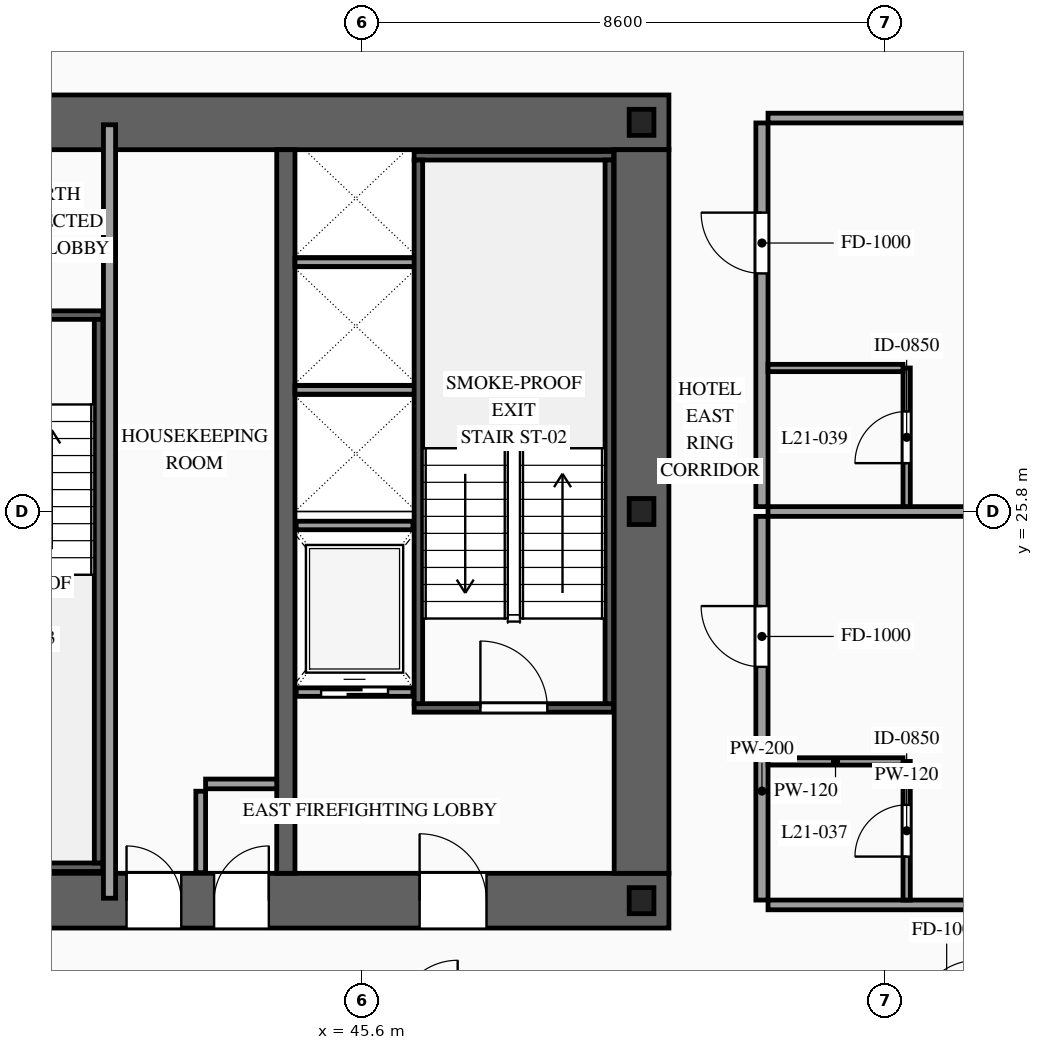
"""IFC4 building model, lengths in metres.
Left out: names, types, materials, properties, quantities, classifications, styles, units other than length and angle.
Written with IfcOpenShell. Run it as: python <this file> out.ifc"""

import sys

from ifc_helpers import new_model, si_unit, direction, frame, frame_2d, origin, origin_2d, place, context, subcontext, project, spatial, rectangle, i_section, extrude, source, transform, mapped, element, fill, save


model = new_model("IFC4")
c1 = context("Model", 3, precision=1e-05, world=origin(), true_north=direction((0.0, 1.0)))
c2 = subcontext(c1, "Body", "Model", "MODEL_VIEW")
j1 = project(units=[si_unit("LENGTHUNIT", "METRE"), si_unit("PLANEANGLEUNIT", "RADIAN")], contexts=[c1])
p1 = place(None, origin())
s1 = spatial("IfcSite", under=j1, at=p1, CompositionType="ELEMENT")
p2 = place(p1, origin())
s2 = spatial("IfcBuilding", under=s1, at=p2, CompositionType="ELEMENT")
p3 = place(p2, frame((0.0, 0.0, 82.0)))
s3 = spatial("IfcBuildingStorey", under=s2, at=p3, CompositionType="ELEMENT", Elevation=82.0)
p4 = place(p3, frame((23.35, 19.4, 0.0), z_axis=(0.0, 0.0, 1.0), x_axis=(1.0, 0.0, 0.0)))
e1 = element("IfcWall", 1, at=p4, inside=s3, PredefinedType="SHEAR", context=c2, shape_type="SweptSolid", body=[
    extrude(rectangle(XDim=27.3, YDim=0.9, at=frame_2d((13.65, 0.0))), origin(), (0.0, 0.0, 1.0), 3.6),
])
p5 = place(p4, frame((2.1, 0.0, 0.0)))
e2 = element("IfcOpeningElement", 2, at=p5, cuts=e1, PredefinedType="OPENING", context=c2, shape_type="SweptSolid", body=[
    extrude(rectangle(XDim=1.1, YDim=2.2, at=frame_2d((0.55, 1.1))), frame((0.0, 0.465, 0.0), z_axis=(0.0, -1.0, 0.0), x_axis=(1.0, 0.0, 0.0)), (0.0, 0.0, 1.0), 0.93),
])
p6 = place(p4, frame((10.0, 0.0, 0.0)))
e3 = element("IfcOpeningElement", 3, at=p6, cuts=e1, PredefinedType="OPENING", context=c2, shape_type="SweptSolid", body=[
    extrude(rectangle(XDim=1.1, YDim=2.2, at=frame_2d((0.55, 1.1))), frame((0.0, 0.465, 0.0), z_axis=(0.0, -1.0, 0.0), x_axis=(1.0, 0.0, 0.0)), (0.0, 0.0, 1.0), 0.93),
])
p7 = place(p4, frame((23.2, 0.0, 0.0)))
e4 = element("IfcOpeningElement", 4, at=p7, cuts=e1, PredefinedType="OPENING", context=c2, shape_type="SweptSolid", body=[
    extrude(rectangle(XDim=1.1, YDim=2.2, at=frame_2d((0.55, 1.1))), frame((0.0, 0.465, 0.0), z_axis=(0.0, -1.0, 0.0), x_axis=(1.0, 0.0, 0.0)), (0.0, 0.0, 1.0), 0.93),
])
p8 = place(p4, frame((19.82, 0.0, 0.0)))
e5 = element("IfcOpeningElement", 5, at=p8, cuts=e1, PredefinedType="OPENING", context=c2, shape_type="SweptSolid", body=[
    extrude(rectangle(XDim=0.9, YDim=2.15, at=frame_2d((0.45, 1.075))), frame((0.0, 0.465, 0.0), z_axis=(0.0, -1.0, 0.0), x_axis=(1.0, 0.0, 0.0)), (0.0, 0.0, 1.0), 0.93),
])
p9 = place(p4, frame((18.38, 0.0, 0.0)))
e6 = element("IfcOpeningElement", 6, at=p9, cuts=e1, PredefinedType="OPENING", context=c2, shape_type="SweptSolid", body=[
    extrude(rectangle(XDim=0.9, YDim=2.15, at=frame_2d((0.45, 1.075))), frame((0.0, 0.465, 0.0), z_axis=(0.0, -1.0, 0.0), x_axis=(1.0, 0.0, 0.0)), (0.0, 0.0, 1.0), 0.93),
])
p10 = place(p3, frame((23.35, 32.2, 0.0), z_axis=(0.0, 0.0, 1.0), x_axis=(1.0, 0.0, 0.0)))
e7 = element("IfcWall", 7, at=p10, inside=s3, PredefinedType="SHEAR", context=c2, shape_type="SweptSolid", body=[
    extrude(rectangle(XDim=27.3, YDim=0.9, at=frame_2d((13.65, 0.0))), origin(), (0.0, 0.0, 1.0), 3.6),
])
p11 = place(p10, frame((4.72, 0.0, 0.0)))
e8 = element("IfcOpeningElement", 8, at=p11, cuts=e7, PredefinedType="OPENING", context=c2, shape_type="SweptSolid", body=[
    extrude(rectangle(XDim=0.9, YDim=2.15, at=frame_2d((0.45, 1.075))), frame((0.0, 0.465, 0.0), z_axis=(0.0, -1.0, 0.0), x_axis=(1.0, 0.0, 0.0)), (0.0, 0.0, 1.0), 0.93),
])
p12 = place(p10, frame((10.0, 0.0, 0.0)))
e9 = element("IfcOpeningElement", 9, at=p12, cuts=e7, PredefinedType="OPENING", context=c2, shape_type="SweptSolid", body=[
    extrude(rectangle(XDim=1.1, YDim=2.2, at=frame_2d((0.55, 1.1))), frame((0.0, 0.465, 0.0), z_axis=(0.0, -1.0, 0.0), x_axis=(1.0, 0.0, 0.0)), (0.0, 0.0, 1.0), 0.93),
])
p13 = place(p10, frame((15.85, 0.0, 0.0)))
e10 = element("IfcOpeningElement", 10, at=p13, cuts=e7, PredefinedType="OPENING", context=c2, shape_type="SweptSolid", body=[
    extrude(rectangle(XDim=1.1, YDim=2.2, at=frame_2d((0.55, 1.1))), frame((0.0, 0.465, 0.0), z_axis=(0.0, -1.0, 0.0), x_axis=(1.0, 0.0, 0.0)), (0.0, 0.0, 1.0), 0.93),
])
m1 = source(origin(), c2, "Body", "SweptSolid", [
    extrude(rectangle(XDim=11.9, YDim=0.9, at=frame_2d((5.95, 0.0))), origin(), (0.0, 0.0, 1.0), 3.6),
])
p14 = place(p3, frame((50.2, 19.85, 0.0), z_axis=(0.0, 0.0, 1.0), x_axis=(0.0, 1.0, 0.0)))
e11 = element("IfcWall", 11, at=p14, inside=s3, PredefinedType="SHEAR", context=c2, shape_type="MappedRepresentation", body=[
    mapped(m1, transform((0.0, 0.0, 0.0), scale=1.0)),
])
m2 = source(origin(), c2, "Body", "SweptSolid", [
    extrude(rectangle(XDim=11.9, YDim=0.3, at=frame_2d((5.95, 0.0))), origin(), (0.0, 0.0, 1.0), 3.6),
])
p15 = place(p3, frame((44.35, 19.85, 0.0), z_axis=(0.0, 0.0, 1.0), x_axis=(0.0, 1.0, 0.0)))
e12 = element("IfcWall", 12, at=p15, inside=s3, PredefinedType="SOLIDWALL", context=c2, shape_type="MappedRepresentation", body=[
    mapped(m2, transform((0.0, 0.0, 0.0), scale=1.0)),
])
m3 = source(origin(), c2, "Body", "SweptSolid", [
    extrude(i_section(OverallWidth=0.407, OverallDepth=0.428, WebThickness=0.02, FlangeThickness=0.035, at=origin_2d()), origin(), (0.0, 0.0, 1.0), 3.6),
])
for number, where, z_axis, x_axis in (
    (13, (50.2, 19.4, 0.0), (0.0, 0.0, 1.0), (1.0, 0.0, 0.0)),
    (14, (50.2, 25.8, 0.0), (0.0, 0.0, 1.0), (1.0, 0.0, 0.0)),
    (15, (50.2, 32.2, 0.0), (0.0, 0.0, 1.0), (1.0, 0.0, 0.0)),
):
    element("IfcColumn", number, at=place(p3, frame(where, z_axis=z_axis, x_axis=x_axis)), inside=s3, PredefinedType="COLUMN", context=c2, shape_type="MappedRepresentation", body=[
        mapped(m3, transform((0.0, 0.0, 0.0), scale=1.0)),
    ])
p16 = place(p3, frame((44.52, 22.83, 0.0), z_axis=(0.0, 0.0, 1.0), x_axis=(1.0, 0.0, 0.0)))
e16 = element("IfcWall", 16, at=p16, inside=s3, PredefinedType="SOLIDWALL", context=c2, shape_type="SweptSolid", body=[
    extrude(rectangle(XDim=1.92, YDim=0.14, at=frame_2d((0.96, 0.0))), origin(), (0.0, 0.0, 1.0), 3.32),
])
p17 = place(p16, frame((0.41, 0.0, 0.0)))
e17 = element("IfcOpeningElement", 17, at=p17, cuts=e16, PredefinedType="OPENING", context=c2, shape_type="SweptSolid", body=[
    extrude(rectangle(XDim=1.1, YDim=2.2, at=frame_2d((0.55, 1.1))), frame((0.0, 0.085, 0.0), z_axis=(0.0, -1.0, 0.0), x_axis=(1.0, 0.0, 0.0)), (0.0, 0.0, 1.0), 0.17),
])
m4 = source(origin(), c2, "Body", "SweptSolid", [
    extrude(rectangle(XDim=1.92, YDim=0.14, at=frame_2d((0.96, 0.0))), origin(), (0.0, 0.0, 1.0), 3.32),
])
p18 = place(p3, frame((44.52, 25.57, 0.0), z_axis=(0.0, 0.0, 1.0), x_axis=(1.0, 0.0, 0.0)))
e18 = element("IfcWall", 18, at=p18, inside=s3, PredefinedType="SOLIDWALL", context=c2, shape_type="MappedRepresentation", body=[
    mapped(m4, transform((0.0, 0.0, 0.0), scale=1.0)),
])
m5 = source(origin(), c2, "Body", "SweptSolid", [
    extrude(rectangle(XDim=2.0, YDim=0.14, at=frame_2d((1.0, 0.0))), origin(), (0.0, 0.0, 1.0), 3.32),
])
for number, where, z_axis, x_axis in (
    (19, (44.5, 27.8, 0.0), (0.0, 0.0, 1.0), (1.0, 0.0, 0.0)),
    (20, (44.5, 29.9, 0.0), (0.0, 0.0, 1.0), (1.0, 0.0, 0.0)),
):
    element("IfcWall", number, at=place(p3, frame(where, z_axis=z_axis, x_axis=x_axis)), inside=s3, PredefinedType="SOLIDWALL", context=c2, shape_type="MappedRepresentation", body=[
        mapped(m5, transform((0.0, 0.0, 0.0), scale=1.0)),
    ])
p19 = place(p3, frame((46.46, 22.57, 0.0), z_axis=(0.0, 0.0, 1.0), x_axis=(1.0, 0.0, 0.0)))
e21 = element("IfcWall", 21, at=p19, inside=s3, PredefinedType="SOLIDWALL", context=c2, shape_type="SweptSolid", body=[
    extrude(rectangle(XDim=3.28, YDim=0.14, at=frame_2d((1.64, 0.0))), origin(), (0.0, 0.0, 1.0), 3.32),
])
p20 = place(p19, frame((1.09, 0.0, 0.0)))
e22 = element("IfcOpeningElement", 22, at=p20, cuts=e21, PredefinedType="OPENING", context=c2, shape_type="SweptSolid", body=[
    extrude(rectangle(XDim=1.1, YDim=2.2, at=frame_2d((0.55, 1.1))), frame((0.0, 0.085, 0.0), z_axis=(0.0, -1.0, 0.0), x_axis=(1.0, 0.0, 0.0)), (0.0, 0.0, 1.0), 0.17),
])
m6 = source(origin(), c2, "Body", "SweptSolid", [
    extrude(rectangle(XDim=3.28, YDim=0.14, at=frame_2d((1.64, 0.0))), origin(), (0.0, 0.0, 1.0), 3.32),
])
p21 = place(p3, frame((46.46, 31.65, 0.0), z_axis=(0.0, 0.0, 1.0), x_axis=(1.0, 0.0, 0.0)))
e23 = element("IfcWall", 23, at=p21, inside=s3, PredefinedType="SOLIDWALL", context=c2, shape_type="MappedRepresentation", body=[
    mapped(m6, transform((0.0, 0.0, 0.0), scale=1.0)),
])
m7 = source(origin(), c2, "Body", "SweptSolid", [
    extrude(rectangle(XDim=8.94, YDim=0.14, at=frame_2d((4.47, 0.0))), origin(), (0.0, 0.0, 1.0), 3.32),
])
for number, where, z_axis, x_axis in (
    (24, (46.53, 22.64, 0.0), (0.0, 0.0, 1.0), (0.0, 1.0, 0.0)),
    (25, (49.67, 22.64, 0.0), (0.0, 0.0, 1.0), (0.0, 1.0, 0.0)),
):
    element("IfcWall", number, at=place(p3, frame(where, z_axis=z_axis, x_axis=x_axis)), inside=s3, PredefinedType="SOLIDWALL", context=c2, shape_type="MappedRepresentation", body=[
        mapped(m7, transform((0.0, 0.0, 0.0), scale=1.0)),
    ])
p22 = place(p3, frame((38.2, 29.03, 0.0), z_axis=(0.0, 0.0, 1.0), x_axis=(1.0, 0.0, 0.0)))
e26 = element("IfcWall", 26, at=p22, inside=s3, PredefinedType="SOLIDWALL", context=c2, shape_type="SweptSolid", body=[
    extrude(rectangle(XDim=3.14, YDim=0.14, at=frame_2d((1.57, 0.0))), origin(), (0.0, 0.0, 1.0), 3.32),
])
p23 = place(p22, frame((1.02, 0.0, 0.0)))
e27 = element("IfcOpeningElement", 27, at=p23, cuts=e26, PredefinedType="OPENING", context=c2, shape_type="SweptSolid", body=[
    extrude(rectangle(XDim=1.1, YDim=2.2, at=frame_2d((0.55, 1.1))), frame((0.0, 0.085, 0.0), z_axis=(0.0, -1.0, 0.0), x_axis=(1.0, 0.0, 0.0)), (0.0, 0.0, 1.0), 0.17),
])
m8 = source(origin(), c2, "Body", "SweptSolid", [
    extrude(rectangle(XDim=3.14, YDim=0.14, at=frame_2d((1.57, 0.0))), origin(), (0.0, 0.0, 1.0), 3.32),
])
p24 = place(p3, frame((38.2, 19.95, 0.0), z_axis=(0.0, 0.0, 1.0), x_axis=(1.0, 0.0, 0.0)))
e28 = element("IfcWall", 28, at=p24, inside=s3, PredefinedType="SOLIDWALL", context=c2, shape_type="MappedRepresentation", body=[
    mapped(m8, transform((0.0, 0.0, 0.0), scale=1.0)),
])
m9 = source(origin(), c2, "Body", "SweptSolid", [
    extrude(rectangle(XDim=8.94, YDim=0.14, at=frame_2d((4.47, 0.0))), origin(), (0.0, 0.0, 1.0), 3.32),
])
p25 = place(p3, frame((41.27, 20.02, 0.0), z_axis=(0.0, 0.0, 1.0), x_axis=(0.0, 1.0, 0.0)))
e29 = element("IfcWall", 29, at=p25, inside=s3, PredefinedType="SOLIDWALL", context=c2, shape_type="MappedRepresentation", body=[
    mapped(m9, transform((0.0, 0.0, 0.0), scale=1.0)),
])
m10 = source(origin(), c2, "Body", "SweptSolid", [
    extrude(rectangle(XDim=1.34, YDim=0.16, at=frame_2d((0.67, 0.0))), origin(), (0.0, 0.0, 1.0), 3.32),
])
p26 = place(p3, frame((42.95, 19.86, 0.0), z_axis=(0.0, 0.0, 1.0), x_axis=(0.0, 1.0, 0.0)))
e30 = element("IfcWall", 30, at=p26, inside=s3, PredefinedType="PARTITIONING", context=c2, shape_type="MappedRepresentation", body=[
    mapped(m10, transform((0.0, 0.0, 0.0), scale=1.0)),
])
m11 = source(origin(), c2, "Body", "SweptSolid", [
    extrude(rectangle(XDim=1.17, YDim=0.16, at=frame_2d((0.585, 0.0))), origin(), (0.0, 0.0, 1.0), 3.32),
])
p27 = place(p3, frame((43.03, 21.32, 0.0), z_axis=(0.0, 0.0, 1.0), x_axis=(1.0, 0.0, 0.0)))
e31 = element("IfcWall", 31, at=p27, inside=s3, PredefinedType="PARTITIONING", context=c2, shape_type="MappedRepresentation", body=[
    mapped(m11, transform((0.0, 0.0, 0.0), scale=1.0)),
])
m12 = source(origin(), c2, "Body", "SweptSolid", [
    extrude(rectangle(XDim=12.72, YDim=0.2, at=frame_2d((6.36, 0.0))), origin(), (0.0, 0.0, 1.0), 3.32),
])
p28 = place(p3, frame((41.45, 19.44, 0.0), z_axis=(0.0, 0.0, 1.0), x_axis=(0.0, 1.0, 0.0)))
e32 = element("IfcWall", 32, at=p28, inside=s3, PredefinedType="PARTITIONING", context=c2, shape_type="MappedRepresentation", body=[
    mapped(m12, transform((0.0, 0.0, 0.0), scale=1.0)),
])
p29 = place(p3, frame((52.18, 19.41, 0.0), z_axis=(0.0, 0.0, 1.0), x_axis=(0.0, 1.0, 0.0)))
e33 = element("IfcWall", 33, at=p29, inside=s3, PredefinedType="PARTITIONING", context=c2, shape_type="SweptSolid", body=[
    extrude(rectangle(XDim=6.31, YDim=0.2, at=frame_2d((3.155, 0.0))), origin(), (0.0, 0.0, 1.0), 3.32),
])
p30 = place(p29, frame((3.835, 0.0, 0.0)))
e34 = element("IfcOpeningElement", 34, at=p30, cuts=e33, PredefinedType="OPENING", context=c2, shape_type="SweptSolid", body=[
    extrude(rectangle(XDim=1.0, YDim=2.2, at=frame_2d((0.5, 1.1))), frame((0.0, 0.115, 0.0), z_axis=(0.0, -1.0, 0.0), x_axis=(1.0, 0.0, 0.0)), (0.0, 0.0, 1.0), 0.23),
])
m13 = source(origin(), c2, "Body", "SweptSolid", [
    extrude(rectangle(XDim=9.67, YDim=0.16, at=frame_2d((4.835, 0.0))), origin(), (0.0, 0.0, 1.0), 1.715),
])
p31 = place(p3, frame((52.28, 25.8, 0.0), z_axis=(0.0, 0.0, 1.0), x_axis=(1.0, 0.0, 0.0)))
e35 = element("IfcWall", 35, at=p31, inside=s3, PredefinedType="PARTITIONING", context=c2, shape_type="MappedRepresentation", body=[
    mapped(m13, transform((0.0, 0.0, 0.0), scale=1.0)),
])
m14 = source(origin(), c2, "Body", "SweptSolid", [
    extrude(rectangle(XDim=9.67, YDim=0.16, at=frame_2d((4.835, 0.0))), origin(), (0.0, 0.0, 1.0), 3.32),
])
p32 = place(p3, frame((52.28, 19.33, 0.0), z_axis=(0.0, 0.0, 1.0), x_axis=(1.0, 0.0, 0.0)))
e36 = element("IfcWall", 36, at=p32, inside=s3, PredefinedType="PARTITIONING", context=c2, shape_type="MappedRepresentation", body=[
    mapped(m14, transform((0.0, 0.0, 0.0), scale=1.0)),
])
p33 = place(p3, frame((54.56, 19.41, 0.0), z_axis=(0.0, 0.0, 1.0), x_axis=(0.0, 1.0, 0.0)))
e37 = element("IfcWall", 37, at=p33, inside=s3, PredefinedType="PARTITIONING", context=c2, shape_type="SweptSolid", body=[
    extrude(rectangle(XDim=2.28, YDim=0.12, at=frame_2d((1.14, 0.0))), origin(), (0.0, 0.0, 1.0), 3.32),
])
p34 = place(p33, frame((0.715, 0.0, 0.0)))
e38 = element("IfcOpeningElement", 38, at=p34, cuts=e37, PredefinedType="OPENING", context=c2, shape_type="SweptSolid", body=[
    extrude(rectangle(XDim=0.85, YDim=2.1, at=frame_2d((0.425, 1.05))), frame((0.0, 0.075, 0.0), z_axis=(0.0, -1.0, 0.0), x_axis=(1.0, 0.0, 0.0)), (0.0, 0.0, 1.0), 0.15),
])
m15 = source(origin(), c2, "Body", "SweptSolid", [
    extrude(rectangle(XDim=2.22, YDim=0.12, at=frame_2d((1.11, 0.0))), origin(), (0.0, 0.0, 1.0), 3.32),
])
p35 = place(p3, frame((52.28, 21.69, 0.0), z_axis=(0.0, 0.0, 1.0), x_axis=(1.0, 0.0, 0.0)))
e39 = element("IfcWall", 39, at=p35, inside=s3, PredefinedType="PARTITIONING", context=c2, shape_type="MappedRepresentation", body=[
    mapped(m15, transform((0.0, 0.0, 0.0), scale=1.0)),
])
p36 = place(p3, frame((52.18, 25.88, 0.0), z_axis=(0.0, 0.0, 1.0), x_axis=(0.0, 1.0, 0.0)))
e40 = element("IfcWall", 40, at=p36, inside=s3, PredefinedType="PARTITIONING", context=c2, shape_type="SweptSolid", body=[
    extrude(rectangle(XDim=6.31, YDim=0.2, at=frame_2d((3.155, 0.0))), origin(), (0.0, 0.0, 1.0), 3.32),
])
p37 = place(p36, frame((3.835, 0.0, 0.0)))
e41 = element("IfcOpeningElement", 41, at=p37, cuts=e40, PredefinedType="OPENING", context=c2, shape_type="SweptSolid", body=[
    extrude(rectangle(XDim=1.0, YDim=2.2, at=frame_2d((0.5, 1.1))), frame((0.0, 0.115, 0.0), z_axis=(0.0, -1.0, 0.0), x_axis=(1.0, 0.0, 0.0)), (0.0, 0.0, 1.0), 0.23),
])
p38 = place(p3, frame((52.28, 32.27, 0.0), z_axis=(0.0, 0.0, 1.0), x_axis=(1.0, 0.0, 0.0)))
e42 = element("IfcWall", 42, at=p38, inside=s3, PredefinedType="PARTITIONING", context=c2, shape_type="MappedRepresentation", body=[
    mapped(m14, transform((0.0, 0.0, 0.0), scale=1.0)),
])
p39 = place(p3, frame((54.56, 25.88, 0.0), z_axis=(0.0, 0.0, 1.0), x_axis=(0.0, 1.0, 0.0)))
e43 = element("IfcWall", 43, at=p39, inside=s3, PredefinedType="PARTITIONING", context=c2, shape_type="SweptSolid", body=[
    extrude(rectangle(XDim=2.28, YDim=0.12, at=frame_2d((1.14, 0.0))), origin(), (0.0, 0.0, 1.0), 3.32),
])
p40 = place(p39, frame((0.715, 0.0, 0.0)))
e44 = element("IfcOpeningElement", 44, at=p40, cuts=e43, PredefinedType="OPENING", context=c2, shape_type="SweptSolid", body=[
    extrude(rectangle(XDim=0.85, YDim=2.1, at=frame_2d((0.425, 1.05))), frame((0.0, 0.075, 0.0), z_axis=(0.0, -1.0, 0.0), x_axis=(1.0, 0.0, 0.0)), (0.0, 0.0, 1.0), 0.15),
])
p41 = place(p3, frame((52.28, 28.16, 0.0), z_axis=(0.0, 0.0, 1.0), x_axis=(1.0, 0.0, 0.0)))
e45 = element("IfcWall", 45, at=p41, inside=s3, PredefinedType="PARTITIONING", context=c2, shape_type="MappedRepresentation", body=[
    mapped(m15, transform((0.0, 0.0, 0.0), scale=1.0)),
])
m16 = source(origin(), c2, "Body", "SweptSolid", [
    extrude(rectangle(XDim=1.1, YDim=2.2, at=frame_2d((0.55, 1.1))), frame((0.0, 0.025, 0.0), z_axis=(0.0, -1.0, 0.0), x_axis=(1.0, 0.0, 0.0)), (0.0, 0.0, 1.0), 0.05),
])
p42 = place(p17, origin())
e46 = element("IfcDoor", 46, at=p42, inside=s3, OperationType="SLIDING_TO_RIGHT", PredefinedType="DOOR", context=c2, shape_type="MappedRepresentation", body=[
    mapped(m16, transform((0.0, 0.0, 0.0), scale=1.0)),
])
fill(e17, e46)
m17 = source(origin(), c2, "Body", "SweptSolid", [
    extrude(rectangle(XDim=1.1, YDim=2.2, at=frame_2d((0.55, 1.1))), frame((0.0, 0.025, 0.0), z_axis=(0.0, -1.0, 0.0), x_axis=(1.0, 0.0, 0.0)), (0.0, 0.0, 1.0), 0.05),
])
p43 = place(p20, origin())
e47 = element("IfcDoor", 47, at=p43, inside=s3, OperationType="SINGLE_SWING_LEFT", PredefinedType="DOOR", context=c2, shape_type="MappedRepresentation", body=[
    mapped(m17, transform((0.0, 0.0, 0.0), scale=1.0)),
])
fill(e22, e47)
p44 = place(p7, origin())
e48 = element("IfcDoor", 48, at=p44, inside=s3, OperationType="SINGLE_SWING_LEFT", PredefinedType="DOOR", context=c2, shape_type="MappedRepresentation", body=[
    mapped(m17, transform((0.0, 0.0, 0.0), scale=1.0)),
])
fill(e4, e48)
m18 = source(origin(), c2, "Body", "SweptSolid", [
    extrude(rectangle(XDim=0.9, YDim=2.15, at=frame_2d((0.45, 1.075))), frame((0.0, 0.025, 0.0), z_axis=(0.0, -1.0, 0.0), x_axis=(1.0, 0.0, 0.0)), (0.0, 0.0, 1.0), 0.05),
])
p45 = place(p8, origin())
e49 = element("IfcDoor", 49, at=p45, inside=s3, OperationType="SINGLE_SWING_RIGHT", PredefinedType="DOOR", context=c2, shape_type="MappedRepresentation", body=[
    mapped(m18, transform((0.0, 0.0, 0.0), scale=1.0)),
])
fill(e5, e49)
p46 = place(p9, origin())
e50 = element("IfcDoor", 50, at=p46, inside=s3, OperationType="SINGLE_SWING_LEFT", PredefinedType="DOOR", context=c2, shape_type="MappedRepresentation", body=[
    mapped(m18, transform((0.0, 0.0, 0.0), scale=1.0)),
])
fill(e6, e50)
m19 = source(origin(), c2, "Body", "SweptSolid", [
    extrude(rectangle(XDim=1.0, YDim=2.2, at=frame_2d((0.5, 1.1))), frame((0.0, 0.025, 0.0), z_axis=(0.0, -1.0, 0.0), x_axis=(1.0, 0.0, 0.0)), (0.0, 0.0, 1.0), 0.05),
])
p47 = place(p30, origin())
e51 = element("IfcDoor", 51, at=p47, inside=s3, OperationType="SINGLE_SWING_RIGHT", PredefinedType="DOOR", context=c2, shape_type="MappedRepresentation", body=[
    mapped(m19, transform((0.0, 0.0, 0.0), scale=1.0)),
])
fill(e34, e51)
m20 = source(origin(), c2, "Body", "SweptSolid", [
    extrude(rectangle(XDim=0.85, YDim=2.1, at=frame_2d((0.425, 1.05))), frame((0.0, 0.025, 0.0), z_axis=(0.0, -1.0, 0.0), x_axis=(1.0, 0.0, 0.0)), (0.0, 0.0, 1.0), 0.05),
])
p48 = place(p34, origin())
e52 = element("IfcDoor", 52, at=p48, inside=s3, OperationType="SINGLE_SWING_LEFT", PredefinedType="DOOR", context=c2, shape_type="MappedRepresentation", body=[
    mapped(m20, transform((0.0, 0.0, 0.0), scale=1.0)),
])
fill(e38, e52)
p49 = place(p37, origin())
e53 = element("IfcDoor", 53, at=p49, inside=s3, OperationType="SINGLE_SWING_RIGHT", PredefinedType="DOOR", context=c2, shape_type="MappedRepresentation", body=[
    mapped(m19, transform((0.0, 0.0, 0.0), scale=1.0)),
])
fill(e41, e53)
p50 = place(p40, origin())
e54 = element("IfcDoor", 54, at=p50, inside=s3, OperationType="SINGLE_SWING_LEFT", PredefinedType="DOOR", context=c2, shape_type="MappedRepresentation", body=[
    mapped(m20, transform((0.0, 0.0, 0.0), scale=1.0)),
])
fill(e44, e54)
save(model, sys.argv[1])
